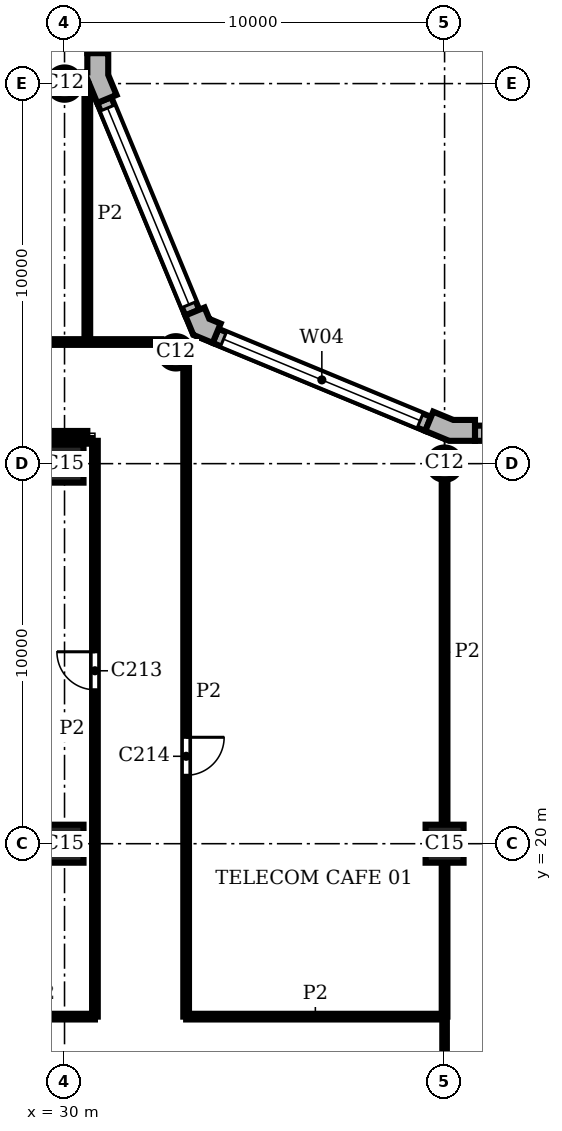
"""IFC4 building model, lengths in metres.
Left out: names, types, materials, properties, quantities, classifications, styles, units other than length and angle.
Written with IfcOpenShell. Run it as: python <this file> out.ifc"""

import sys

from ifc_helpers import new_model, si_unit, direction, frame, frame_2d, origin, origin_2d, place, context, subcontext, project, spatial, polyline, rectangle, circle, outline, extrude, element, fill, save


model = new_model("IFC4")
c1 = context("Model", 3, precision=1e-05, world=origin(), true_north=direction((0.0, 1.0)))
c2 = subcontext(c1, "Body", "Model", "MODEL_VIEW")
j1 = project(units=[si_unit("LENGTHUNIT", "METRE"), si_unit("PLANEANGLEUNIT", "RADIAN")], contexts=[c1])
p1 = place(None, origin())
s1 = spatial("IfcSite", under=j1, at=p1, CompositionType="ELEMENT")
p2 = place(p1, origin())
s2 = spatial("IfcBuilding", under=s1, at=p2, CompositionType="ELEMENT")
p3 = place(p2, frame((0.0, 0.0, 263.1)))
s3 = spatial("IfcBuildingStorey", under=s2, at=p3, CompositionType="ELEMENT", Elevation=263.1)
for number, where, z_axis, x_axis in (
    (1, (40.0, 30.0, 0.0), (0.0, 0.0, 1.0), (1.0, 0.0, 0.0)),
    (2, (32.929, 32.929, 0.0), (0.0, 0.0, 1.0), (1.0, 0.0, 0.0)),
    (3, (30.0, 40.0, 0.0), (0.0, 0.0, 1.0), (1.0, 0.0, 0.0)),
):
    element("IfcColumn", number, at=place(p3, frame(where, z_axis=z_axis, x_axis=x_axis)), inside=s3, PredefinedType="COLUMN", context=c2, shape_type="SweptSolid", body=[
        extrude(circle(Radius=0.425, at=origin_2d()), origin(), (0.0, 0.0, 1.0), 3.9),
    ])
for number, where, z_axis, x_axis in (
    (4, (30.0, 20.0, 0.0), (0.0, 0.0, 1.0), (1.0, 0.0, 0.0)),
    (5, (30.0, 30.0, 0.0), (0.0, 0.0, 1.0), (1.0, 0.0, 0.0)),
    (6, (40.0, 20.0, 0.0), (0.0, 0.0, 1.0), (1.0, 0.0, 0.0)),
):
    element("IfcColumn", number, at=place(p3, frame(where, z_axis=z_axis, x_axis=x_axis)), inside=s3, PredefinedType="COLUMN", context=c2, shape_type="SweptSolid", body=[
        extrude(rectangle(XDim=1.0, YDim=1.0, at=origin_2d()), origin(), (0.0, 0.0, 1.0), 3.9),
    ])
p4 = place(p3, origin())
e7 = element("IfcWall", 7, at=p4, inside=s3, PredefinedType="SOLIDWALL", context=c2, shape_type="SweptSolid", body=[
    extrude(outline(polyline([(40.8, 31.0), (40.8, 31.15), (40.229, 31.15), (39.701, 31.369), (39.644, 31.23), (39.49, 30.861), (40.119, 30.6), (40.8, 30.6), (40.8, 31.0)])), origin(), (0.0, 0.0, 1.0), 3.9),
])
e8 = element("IfcWall", 8, at=p4, inside=s3, PredefinedType="SOLIDWALL", context=c2, shape_type="SweptSolid", body=[
    extrude(outline(polyline([(34.051, 33.547), (34.108, 33.685), (33.809, 33.809), (33.685, 34.108), (33.547, 34.051), (33.177, 33.898), (33.388, 33.388), (33.898, 33.177), (34.051, 33.547)])), origin(), (0.0, 0.0, 1.0), 3.9),
])
e9 = element("IfcWall", 9, at=p4, inside=s3, PredefinedType="SOLIDWALL", context=c2, shape_type="SweptSolid", body=[
    extrude(outline(polyline([(30.62, 39.995), (30.62, 40.071), (30.861, 39.49), (31.23, 39.644), (31.369, 39.701), (31.15, 40.229), (31.15, 40.8), (31.0, 40.8), (30.6, 40.8), (30.6, 40.295), (30.425, 40.295), (30.425, 39.995), (30.62, 39.995)])), origin(), (0.0, 0.0, 1.0), 3.9),
])
p5 = place(p3, frame((49.2, 30.8, 0.0), z_axis=(0.0, 0.0, 1.0), x_axis=(-1.0, 0.0, 0.0)))
e10 = element("IfcWall", 10, at=p5, inside=s3, PredefinedType="SOLIDWALL", context=c2, shape_type="SweptSolid", body=[
    extrude(rectangle(XDim=8.4, YDim=0.4, at=frame_2d((4.2, 0.0))), origin(), (0.0, 0.0, 1.0), 3.9),
])
p6 = place(p5, frame((0.2, 0.0, 0.9)))
e11 = element("IfcOpeningElement", 11, at=p6, cuts=e10, PredefinedType="OPENING", context=c2, shape_type="SweptSolid", body=[
    extrude(rectangle(XDim=8.0, YDim=2.35, at=frame_2d((4.0, 1.175))), frame((0.0, 0.21, 0.0), z_axis=(0.0, -1.0, 0.0), x_axis=(1.0, 0.0, 0.0)), (0.0, 0.0, 1.0), 0.42),
])
p7 = place(p3, frame((39.567, 31.045, 0.0), z_axis=(0.0, 0.0, 1.0), x_axis=(-0.923891000409, 0.382655745237, 0.0)))
e12 = element("IfcWall", 12, at=p7, inside=s3, PredefinedType="SOLIDWALL", context=c2, shape_type="SweptSolid", body=[
    extrude(rectangle(XDim=6.053, YDim=0.4, at=frame_2d((3.027, 0.0))), origin(), (0.0, 0.0, 1.0), 3.9),
])
p8 = place(p7, frame((0.227, 0.0, 0.9)))
e13 = element("IfcOpeningElement", 13, at=p8, cuts=e12, PredefinedType="OPENING", context=c2, shape_type="SweptSolid", body=[
    extrude(rectangle(XDim=5.6, YDim=2.35, at=frame_2d((2.8, 1.175))), frame((0.0, 0.21, 0.0), z_axis=(0.0, -1.0, 0.0), x_axis=(1.0, 0.0, 0.0)), (0.0, 0.0, 1.0), 0.42),
])
p9 = place(p3, frame((33.362, 33.974, 0.0), z_axis=(0.0, 0.0, 1.0), x_axis=(-0.382655745237, 0.923891000409, 0.0)))
e14 = element("IfcWall", 14, at=p9, inside=s3, PredefinedType="SOLIDWALL", context=c2, shape_type="SweptSolid", body=[
    extrude(rectangle(XDim=6.053, YDim=0.4, at=frame_2d((3.027, 0.0))), origin(), (0.0, 0.0, 1.0), 3.9),
])
p10 = place(p9, frame((0.227, 0.0, 0.9)))
e15 = element("IfcOpeningElement", 15, at=p10, cuts=e14, PredefinedType="OPENING", context=c2, shape_type="SweptSolid", body=[
    extrude(rectangle(XDim=5.6, YDim=2.35, at=frame_2d((2.8, 1.175))), frame((0.0, 0.21, 0.0), z_axis=(0.0, -1.0, 0.0), x_axis=(1.0, 0.0, 0.0)), (0.0, 0.0, 1.0), 0.42),
])
p11 = place(p3, frame((30.8, 40.8, 0.0), z_axis=(0.0, 0.0, 1.0), x_axis=(0.0, 1.0, 0.0)))
e16 = element("IfcWall", 16, at=p11, inside=s3, PredefinedType="SOLIDWALL", context=c2, shape_type="SweptSolid", body=[
    extrude(rectangle(XDim=18.4, YDim=0.4, at=frame_2d((9.2, 0.0))), origin(), (0.0, 0.0, 1.0), 3.9),
])
p12 = place(p11, frame((0.2, 0.0, 0.9)))
e17 = element("IfcOpeningElement", 17, at=p12, cuts=e16, PredefinedType="OPENING", context=c2, shape_type="SweptSolid", body=[
    extrude(rectangle(XDim=8.0, YDim=2.35, at=frame_2d((4.0, 1.175))), frame((0.0, 0.21, 0.0), z_axis=(0.0, -1.0, 0.0), x_axis=(1.0, 0.0, 0.0)), (0.0, 0.0, 1.0), 0.42),
])
p13 = place(p11, frame((10.2, 0.0, 0.9)))
e18 = element("IfcOpeningElement", 18, at=p13, cuts=e16, PredefinedType="OPENING", context=c2, shape_type="SweptSolid", body=[
    extrude(rectangle(XDim=8.0, YDim=2.35, at=frame_2d((4.0, 1.175))), frame((0.0, 0.21, 0.0), z_axis=(0.0, -1.0, 0.0), x_axis=(1.0, 0.0, 0.0)), (0.0, 0.0, 1.0), 0.42),
])
p14 = place(p3, frame((30.6, 33.2, 0.0), z_axis=(0.0, 0.0, 1.0), x_axis=(0.0, 1.0, 0.0)))
e19 = element("IfcWall", 19, at=p14, inside=s3, PredefinedType="PARTITIONING", context=c2, shape_type="SweptSolid", body=[
    extrude(rectangle(XDim=6.738, YDim=0.15, at=frame_2d((3.369, 0.0))), origin(), (0.0, 0.0, 1.0), 3.58),
])
p15 = place(p3, frame((30.8, 15.45, 0.0), z_axis=(0.0, 0.0, 1.0), x_axis=(0.0, 1.0, 0.0)))
e20 = element("IfcWall", 20, at=p15, inside=s3, PredefinedType="PARTITIONING", context=c2, shape_type="SweptSolid", body=[
    extrude(rectangle(XDim=15.15, YDim=0.15, at=frame_2d((7.575, 0.0))), origin(), (0.0, 0.0, 1.0), 3.58),
])
p16 = place(p15, frame((8.6, 0.0, 0.0)))
e21 = element("IfcOpeningElement", 21, at=p16, cuts=e20, PredefinedType="OPENING", context=c2, shape_type="SweptSolid", body=[
    extrude(rectangle(XDim=1.0, YDim=2.1, at=frame_2d((0.5, 1.05))), frame((0.0, 0.085, 0.0), z_axis=(0.0, -1.0, 0.0), x_axis=(1.0, 0.0, 0.0)), (0.0, 0.0, 1.0), 0.17),
])
p17 = place(p3, frame((33.2, 15.45, 0.0), z_axis=(0.0, 0.0, 1.0), x_axis=(0.0, 1.0, 0.0)))
e22 = element("IfcWall", 22, at=p17, inside=s3, PredefinedType="PARTITIONING", context=c2, shape_type="SweptSolid", body=[
    extrude(rectangle(XDim=17.102, YDim=0.15, at=frame_2d((8.551, 0.0))), origin(), (0.0, 0.0, 1.0), 3.58),
])
p18 = place(p17, frame((6.35, 0.0, 0.0)))
e23 = element("IfcOpeningElement", 23, at=p18, cuts=e22, PredefinedType="OPENING", context=c2, shape_type="SweptSolid", body=[
    extrude(rectangle(XDim=1.0, YDim=2.1, at=frame_2d((0.5, 1.05))), frame((0.0, 0.085, 0.0), z_axis=(0.0, -1.0, 0.0), x_axis=(1.0, 0.0, 0.0)), (0.0, 0.0, 1.0), 0.17),
])
p19 = place(p3, frame((40.0, 15.45, 0.0), z_axis=(0.0, 0.0, 1.0), x_axis=(0.0, 1.0, 0.0)))
e24 = element("IfcWall", 24, at=p19, inside=s3, PredefinedType="PARTITIONING", context=c2, shape_type="SweptSolid", body=[
    extrude(rectangle(XDim=4.05, YDim=0.15, at=frame_2d((2.025, 0.0))), origin(), (0.0, 0.0, 1.0), 3.58),
])
p20 = place(p3, frame((40.0, 20.5, 0.0), z_axis=(0.0, 0.0, 1.0), x_axis=(0.0, 1.0, 0.0)))
e25 = element("IfcWall", 25, at=p20, inside=s3, PredefinedType="PARTITIONING", context=c2, shape_type="SweptSolid", body=[
    extrude(rectangle(XDim=9.075, YDim=0.15, at=frame_2d((4.538, 0.0))), origin(), (0.0, 0.0, 1.0), 3.58),
])
p21 = place(p3, frame((28.0, 15.45, 0.0), z_axis=(0.0, 0.0, 1.0), x_axis=(1.0, 0.0, 0.0)))
e26 = element("IfcWall", 26, at=p21, inside=s3, PredefinedType="PARTITIONING", context=c2, shape_type="SweptSolid", body=[
    extrude(rectangle(XDim=2.8, YDim=0.15, at=frame_2d((1.4, 0.0))), origin(), (0.0, 0.0, 1.0), 3.58),
])
p22 = place(p3, frame((33.2, 15.45, 0.0), z_axis=(0.0, 0.0, 1.0), x_axis=(1.0, 0.0, 0.0)))
e27 = element("IfcWall", 27, at=p22, inside=s3, PredefinedType="PARTITIONING", context=c2, shape_type="SweptSolid", body=[
    extrude(rectangle(XDim=6.8, YDim=0.15, at=frame_2d((3.4, 0.0))), origin(), (0.0, 0.0, 1.0), 3.58),
])
p23 = place(p3, frame((28.002, 30.6, 0.0), z_axis=(0.0, 0.0, 1.0), x_axis=(1.0, 0.0, 0.0)))
e28 = element("IfcWall", 28, at=p23, inside=s3, PredefinedType="PARTITIONING", context=c2, shape_type="SweptSolid", body=[
    extrude(rectangle(XDim=2.723, YDim=0.15, at=frame_2d((1.362, 0.0))), origin(), (0.0, 0.0, 1.0), 3.58),
])
p24 = place(p3, frame((16.2, 33.2, 0.0), z_axis=(0.0, 0.0, 1.0), x_axis=(1.0, 0.0, 0.0)))
e29 = element("IfcWall", 29, at=p24, inside=s3, PredefinedType="PARTITIONING", context=c2, shape_type="SweptSolid", body=[
    extrude(rectangle(XDim=16.352, YDim=0.15, at=frame_2d((8.176, 0.0))), origin(), (0.0, 0.0, 1.0), 3.58),
])
p25 = place(p24, frame((7.1, 0.0, 0.0)))
e30 = element("IfcOpeningElement", 30, at=p25, cuts=e29, PredefinedType="OPENING", context=c2, shape_type="SweptSolid", body=[
    extrude(rectangle(XDim=1.0, YDim=2.1, at=frame_2d((0.5, 1.05))), frame((0.0, 0.085, 0.0), z_axis=(0.0, -1.0, 0.0), x_axis=(1.0, 0.0, 0.0)), (0.0, 0.0, 1.0), 0.17),
])
p26 = place(p3, frame((40.0, 13.05, 0.0), z_axis=(0.0, 0.0, 1.0), x_axis=(0.0, 1.0, 0.0)))
e31 = element("IfcWall", 31, at=p26, inside=s3, PredefinedType="PARTITIONING", context=c2, shape_type="SweptSolid", body=[
    extrude(rectangle(XDim=2.4, YDim=0.12, at=frame_2d((1.2, 0.0))), origin(), (0.0, 0.0, 1.0), 3.58),
])
p27 = place(p3, frame((13.802, 30.8, 0.0), z_axis=(0.0, 0.0, 1.0), x_axis=(1.0, 0.0, 0.0)))
e32 = element("IfcWall", 32, at=p27, inside=s3, PredefinedType="PARTITIONING", context=c2, shape_type="SweptSolid", body=[
    extrude(rectangle(XDim=16.798, YDim=0.12, at=frame_2d((8.399, 0.0))), origin(), (0.0, 0.0, 1.0), 3.58),
])
p28 = place(p27, frame((8.85, 0.0, 0.0)))
e33 = element("IfcOpeningElement", 33, at=p28, cuts=e32, PredefinedType="OPENING", context=c2, shape_type="SweptSolid", body=[
    extrude(rectangle(XDim=1.0, YDim=2.1, at=frame_2d((0.5, 1.05))), frame((0.0, 0.07, 0.0), z_axis=(0.0, -1.0, 0.0), x_axis=(1.0, 0.0, 0.0)), (0.0, 0.0, 1.0), 0.14),
])
p29 = place(p8, origin())
e34 = element("IfcWindow", 34, at=p29, inside=s3, PartitioningType="SINGLE_PANEL", PredefinedType="WINDOW", context=c2, shape_type="SweptSolid", body=[
    extrude(rectangle(XDim=5.6, YDim=2.35, at=frame_2d((2.8, 1.175))), frame((0.0, 0.16, 0.0), z_axis=(0.0, -1.0, 0.0), x_axis=(1.0, 0.0, 0.0)), (0.0, 0.0, 1.0), 0.06),
])
fill(e13, e34)
p30 = place(p10, origin())
e35 = element("IfcWindow", 35, at=p30, inside=s3, PartitioningType="SINGLE_PANEL", PredefinedType="WINDOW", context=c2, shape_type="SweptSolid", body=[
    extrude(rectangle(XDim=5.6, YDim=2.35, at=frame_2d((2.8, 1.175))), frame((0.0, 0.16, 0.0), z_axis=(0.0, -1.0, 0.0), x_axis=(1.0, 0.0, 0.0)), (0.0, 0.0, 1.0), 0.06),
])
fill(e15, e35)
p31 = place(p16, origin())
e36 = element("IfcDoor", 36, at=p31, inside=s3, OperationType="SINGLE_SWING_RIGHT", PredefinedType="DOOR", context=c2, shape_type="SweptSolid", body=[
    extrude(rectangle(XDim=1.0, YDim=2.1, at=frame_2d((0.5, 1.05))), frame((0.0, 0.025, 0.0), z_axis=(0.0, -1.0, 0.0), x_axis=(1.0, 0.0, 0.0)), (0.0, 0.0, 1.0), 0.05),
])
fill(e21, e36)
p32 = place(p18, frame((1.0, 0.0, 0.0), z_axis=(0.0, 0.0, 1.0), x_axis=(-1.0, 0.0, 0.0)))
e37 = element("IfcDoor", 37, at=p32, inside=s3, OperationType="SINGLE_SWING_LEFT", PredefinedType="DOOR", context=c2, shape_type="SweptSolid", body=[
    extrude(rectangle(XDim=1.0, YDim=2.1, at=frame_2d((0.5, 1.05))), frame((0.0, 0.025, 0.0), z_axis=(0.0, -1.0, 0.0), x_axis=(1.0, 0.0, 0.0)), (0.0, 0.0, 1.0), 0.05),
])
fill(e23, e37)
save(model, sys.argv[1])
